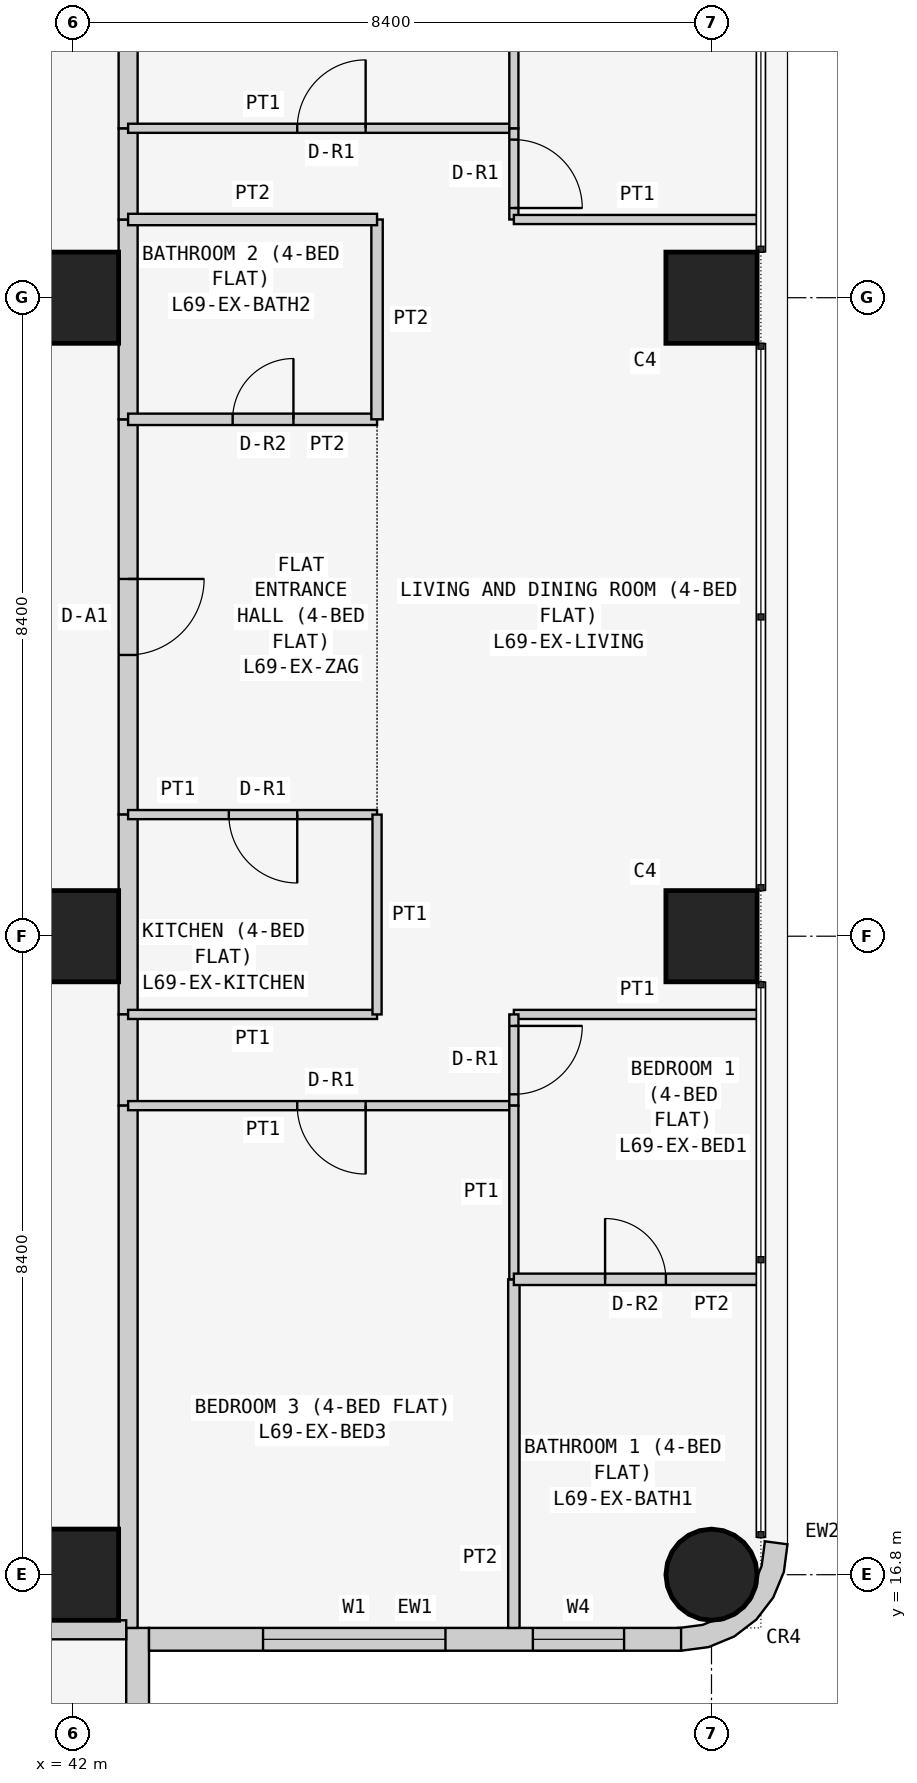
"""IFC4 building model, lengths in metres.
Left out: names, types, materials, properties, quantities, classifications, styles, units other than length and angle.
Written with IfcOpenShell. Run it as: python <this file> out.ifc"""

import sys

from ifc_helpers import new_model, si_unit, direction, frame, frame_2d, origin, origin_2d, place, context, subcontext, project, spatial, polyline, rectangle, circle, outline, extrude, element, fill, save


model = new_model("IFC4")
c1 = context("Model", 3, precision=1e-05, world=origin(), true_north=direction((0.0, 1.0)))
c2 = subcontext(c1, "Body", "Model", "MODEL_VIEW")
j1 = project(units=[si_unit("LENGTHUNIT", "METRE"), si_unit("PLANEANGLEUNIT", "RADIAN")], contexts=[c1])
p1 = place(None, origin())
s1 = spatial("IfcSite", under=j1, at=p1, CompositionType="ELEMENT")
p2 = place(p1, origin())
s2 = spatial("IfcBuilding", under=s1, at=p2, CompositionType="ELEMENT")
p3 = place(p2, frame((0.0, 0.0, 264.9)))
s3 = spatial("IfcBuildingStorey", under=s2, at=p3, CompositionType="ELEMENT", Elevation=264.9)
for number, where, z_axis, x_axis in (
    (1, (42.0, 16.8, 0.0), (0.0, 0.0, 1.0), (1.0, 0.0, 0.0)),
    (2, (42.0, 25.2, 0.0), (0.0, 0.0, 1.0), (1.0, 0.0, 0.0)),
    (3, (42.0, 33.6, 0.0), (0.0, 0.0, 1.0), (1.0, 0.0, 0.0)),
):
    element("IfcColumn", number, at=place(p3, frame(where, z_axis=z_axis, x_axis=x_axis)), inside=s3, PredefinedType="COLUMN", context=c2, shape_type="SweptSolid", body=[
        extrude(rectangle(XDim=1.2, YDim=1.2, at=origin_2d()), origin(), (0.0, 0.0, 1.0), 3.6),
    ])
p4 = place(p3, frame((50.4, 16.8, 0.0), z_axis=(0.0, 0.0, 1.0), x_axis=(1.0, 0.0, 0.0)))
e4 = element("IfcColumn", 4, at=p4, inside=s3, PredefinedType="COLUMN", context=c2, shape_type="SweptSolid", body=[
    extrude(circle(Radius=0.6, at=origin_2d()), origin(), (0.0, 0.0, 1.0), 3.6),
])
for number, where, z_axis, x_axis in (
    (5, (50.4, 25.2, 0.0), (0.0, 0.0, 1.0), (1.0, 0.0, 0.0)),
    (6, (50.4, 33.6, 0.0), (0.0, 0.0, 1.0), (1.0, 0.0, 0.0)),
):
    element("IfcColumn", number, at=place(p3, frame(where, z_axis=z_axis, x_axis=x_axis)), inside=s3, PredefinedType="COLUMN", context=c2, shape_type="SweptSolid", body=[
        extrude(rectangle(XDim=1.2, YDim=1.2, at=origin_2d()), origin(), (0.0, 0.0, 1.0), 3.6),
    ])
p5 = place(p3, frame((42.85, 8.8, 0.0), z_axis=(0.0, 0.0, 1.0), x_axis=(0.0, 1.0, 0.0)))
e7 = element("IfcWall", 7, at=p5, inside=s3, PredefinedType="SOLIDWALL", context=c2, shape_type="SweptSolid", body=[
    extrude(rectangle(XDim=7.3, YDim=0.3, at=frame_2d((3.65, 0.0))), origin(), (0.0, 0.0, 1.0), 3.45),
])
p6 = place(p5, frame((3.1, 0.0, 0.9)))
e8 = element("IfcOpeningElement", 8, at=p6, cuts=e7, PredefinedType="OPENING", context=c2, shape_type="SweptSolid", body=[
    extrude(rectangle(XDim=2.4, YDim=1.5, at=frame_2d((1.2, 0.75))), frame((0.0, 0.16, 0.0), z_axis=(0.0, -1.0, 0.0), x_axis=(1.0, 0.0, 0.0)), (0.0, 0.0, 1.0), 0.32),
])
p7 = place(p5, frame((0.75, 0.0, 0.9)))
e9 = element("IfcOpeningElement", 9, at=p7, cuts=e7, PredefinedType="OPENING", context=c2, shape_type="SweptSolid", body=[
    extrude(rectangle(XDim=1.2, YDim=1.5, at=frame_2d((0.6, 0.75))), frame((0.0, 0.16, 0.0), z_axis=(0.0, -1.0, 0.0), x_axis=(1.0, 0.0, 0.0)), (0.0, 0.0, 1.0), 0.32),
])
p8 = place(p3, frame((43.0, 15.95, 0.0), z_axis=(0.0, 0.0, 1.0), x_axis=(1.0, 0.0, 0.0)))
e10 = element("IfcWall", 10, at=p8, inside=s3, PredefinedType="SOLIDWALL", context=c2, shape_type="SweptSolid", body=[
    extrude(rectangle(XDim=7.0, YDim=0.3, at=frame_2d((3.5, 0.0))), origin(), (0.0, 0.0, 1.0), 3.45),
])
p9 = place(p8, frame((1.5, 0.0, 0.9)))
e11 = element("IfcOpeningElement", 11, at=p9, cuts=e10, PredefinedType="OPENING", context=c2, shape_type="SweptSolid", body=[
    extrude(rectangle(XDim=2.4, YDim=1.5, at=frame_2d((1.2, 0.75))), frame((0.0, 0.16, 0.0), z_axis=(0.0, -1.0, 0.0), x_axis=(1.0, 0.0, 0.0)), (0.0, 0.0, 1.0), 0.32),
])
p10 = place(p8, frame((5.05, 0.0, 0.9)))
e12 = element("IfcOpeningElement", 12, at=p10, cuts=e10, PredefinedType="OPENING", context=c2, shape_type="SweptSolid", body=[
    extrude(rectangle(XDim=1.2, YDim=1.5, at=frame_2d((0.6, 0.75))), frame((0.0, 0.16, 0.0), z_axis=(0.0, -1.0, 0.0), x_axis=(1.0, 0.0, 0.0)), (0.0, 0.0, 1.0), 0.32),
])
p11 = place(p3, frame((50.038, 16.224, 0.0), z_axis=(0.0, 0.0, 1.0), x_axis=(0.707106781187, -0.707106781187, 0.0)))
e13 = element("IfcWall", 13, at=p11, inside=s3, PredefinedType="SOLIDWALL", context=c2, shape_type="SweptSolid", body=[
    extrude(outline(polyline([(0.047, 1.455), (0.233, 1.212), (0.292, 1.069), (0.358, 1.003), (0.449, 0.782), (0.449, 0.543), (0.358, 0.322), (0.292, 0.257), (0.233, 0.114), (0.047, -0.129), (0.033, -0.143), (0.273, -0.327), (0.495, -0.037), (0.635, 0.301), (0.683, 0.663), (0.635, 1.025), (0.495, 1.363), (0.273, 1.653), (0.033, 1.469), (0.047, 1.455)])), origin(), (0.0, 0.0, 1.0), 3.45),
])
p12 = place(p3, frame((42.725, 32.0, 0.0), z_axis=(0.0, 0.0, 1.0), x_axis=(0.0, -1.0, 0.0)))
e14 = element("IfcWall", 14, at=p12, inside=s3, PredefinedType="PARTITIONING", context=c2, shape_type="SweptSolid", body=[
    extrude(rectangle(XDim=5.2, YDim=0.25, at=frame_2d((2.6, 0.0))), origin(), (0.0, 0.0, 1.0), 3.45),
])
p13 = place(p12, frame((2.1, 0.0, 0.0)))
e15 = element("IfcOpeningElement", 15, at=p13, cuts=e14, PredefinedType="OPENING", context=c2, shape_type="SweptSolid", body=[
    extrude(rectangle(XDim=1.0, YDim=2.1, at=frame_2d((0.5, 1.05))), frame((0.0, 0.135, 0.0), z_axis=(0.0, -1.0, 0.0), x_axis=(1.0, 0.0, 0.0)), (0.0, 0.0, 1.0), 0.27),
])
p14 = place(p3, frame((42.725, 34.629, 0.0), z_axis=(0.0, 0.0, 1.0), x_axis=(0.0, -1.0, 0.0)))
e16 = element("IfcWall", 16, at=p14, inside=s3, PredefinedType="PARTITIONING", context=c2, shape_type="SweptSolid", body=[
    extrude(rectangle(XDim=2.629, YDim=0.25, at=frame_2d((1.314, 0.0))), origin(), (0.0, 0.0, 1.0), 3.45),
])
p15 = place(p3, frame((42.725, 26.8, 0.0), z_axis=(0.0, 0.0, 1.0), x_axis=(0.0, -1.0, 0.0)))
e17 = element("IfcWall", 17, at=p15, inside=s3, PredefinedType="PARTITIONING", context=c2, shape_type="SweptSolid", body=[
    extrude(rectangle(XDim=2.629, YDim=0.25, at=frame_2d((1.314, 0.0))), origin(), (0.0, 0.0, 1.0), 3.45),
])
p16 = place(p3, frame((42.725, 24.171, 0.0), z_axis=(0.0, 0.0, 1.0), x_axis=(0.0, -1.0, 0.0)))
e18 = element("IfcWall", 18, at=p16, inside=s3, PredefinedType="PARTITIONING", context=c2, shape_type="SweptSolid", body=[
    extrude(rectangle(XDim=1.2, YDim=0.25, at=frame_2d((0.6, 0.0))), origin(), (0.0, 0.0, 1.0), 3.45),
])
p17 = place(p3, frame((42.725, 35.829, 0.0), z_axis=(0.0, 0.0, 1.0), x_axis=(0.0, -1.0, 0.0)))
e19 = element("IfcWall", 19, at=p17, inside=s3, PredefinedType="PARTITIONING", context=c2, shape_type="SweptSolid", body=[
    extrude(rectangle(XDim=1.2, YDim=0.25, at=frame_2d((0.6, 0.0))), origin(), (0.0, 0.0, 1.0), 3.45),
])
for number, where, z_axis, x_axis in (
    (20, (42.725, 42.7, 0.0), (0.0, 0.0, 1.0), (0.0, -1.0, 0.0)),
    (21, (42.725, 22.971, 0.0), (0.0, 0.0, 1.0), (0.0, -1.0, 0.0)),
    (22, (42.7, 16.075, 0.0), (0.0, 0.0, 1.0), (-1.0, 0.0, 0.0)),
):
    element("IfcWall", number, at=place(p3, frame(where, z_axis=z_axis, x_axis=x_axis)), inside=s3, PredefinedType="PARTITIONING", context=c2, shape_type="SweptSolid", body=[
        extrude(rectangle(XDim=6.871, YDim=0.25, at=frame_2d((3.436, 0.0))), origin(), (0.0, 0.0, 1.0), 3.45),
    ])
p18 = place(p3, frame((46.0, 32.0, 0.0), z_axis=(0.0, 0.0, 1.0), x_axis=(-1.0, 0.0, 0.0)))
e23 = element("IfcWall", 23, at=p18, inside=s3, PredefinedType="PARTITIONING", context=c2, shape_type="SweptSolid", body=[
    extrude(rectangle(XDim=3.275, YDim=0.15, at=frame_2d((1.637, 0.0))), origin(), (0.0, 0.0, 1.0), 3.45),
])
p19 = place(p18, frame((1.1, 0.0, 0.0)))
e24 = element("IfcOpeningElement", 24, at=p19, cuts=e23, PredefinedType="OPENING", context=c2, shape_type="SweptSolid", body=[
    extrude(rectangle(XDim=0.8, YDim=2.1, at=frame_2d((0.4, 1.05))), frame((0.0, 0.085, 0.0), z_axis=(0.0, -1.0, 0.0), x_axis=(1.0, 0.0, 0.0)), (0.0, 0.0, 1.0), 0.17),
])
p20 = place(p3, frame((42.725, 26.8, 0.0), z_axis=(0.0, 0.0, 1.0), x_axis=(1.0, 0.0, 0.0)))
e25 = element("IfcWall", 25, at=p20, inside=s3, PredefinedType="PARTITIONING", context=c2, shape_type="SweptSolid", body=[
    extrude(rectangle(XDim=3.275, YDim=0.12, at=frame_2d((1.637, 0.0))), origin(), (0.0, 0.0, 1.0), 3.45),
])
p21 = place(p20, frame((1.325, 0.0, 0.0)))
e26 = element("IfcOpeningElement", 26, at=p21, cuts=e25, PredefinedType="OPENING", context=c2, shape_type="SweptSolid", body=[
    extrude(rectangle(XDim=0.9, YDim=2.1, at=frame_2d((0.45, 1.05))), frame((0.0, 0.07, 0.0), z_axis=(0.0, -1.0, 0.0), x_axis=(1.0, 0.0, 0.0)), (0.0, 0.0, 1.0), 0.14),
])
p22 = place(p3, frame((46.0, 32.0, 0.0), z_axis=(0.0, 0.0, 1.0), x_axis=(0.0, 1.0, 0.0)))
e27 = element("IfcWall", 27, at=p22, inside=s3, PredefinedType="PARTITIONING", context=c2, shape_type="SweptSolid", body=[
    extrude(rectangle(XDim=2.629, YDim=0.15, at=frame_2d((1.314, 0.0))), origin(), (0.0, 0.0, 1.0), 3.45),
])
p23 = place(p3, frame((46.0, 34.629, 0.0), z_axis=(0.0, 0.0, 1.0), x_axis=(-1.0, 0.0, 0.0)))
e28 = element("IfcWall", 28, at=p23, inside=s3, PredefinedType="PARTITIONING", context=c2, shape_type="SweptSolid", body=[
    extrude(rectangle(XDim=3.275, YDim=0.15, at=frame_2d((1.637, 0.0))), origin(), (0.0, 0.0, 1.0), 3.45),
])
p24 = place(p3, frame((42.725, 24.171, 0.0), z_axis=(0.0, 0.0, 1.0), x_axis=(1.0, 0.0, 0.0)))
e29 = element("IfcWall", 29, at=p24, inside=s3, PredefinedType="PARTITIONING", context=c2, shape_type="SweptSolid", body=[
    extrude(rectangle(XDim=3.275, YDim=0.12, at=frame_2d((1.637, 0.0))), origin(), (0.0, 0.0, 1.0), 3.45),
])
p25 = place(p3, frame((46.0, 24.171, 0.0), z_axis=(0.0, 0.0, 1.0), x_axis=(0.0, 1.0, 0.0)))
e30 = element("IfcWall", 30, at=p25, inside=s3, PredefinedType="PARTITIONING", context=c2, shape_type="SweptSolid", body=[
    extrude(rectangle(XDim=2.629, YDim=0.12, at=frame_2d((1.314, 0.0))), origin(), (0.0, 0.0, 1.0), 3.45),
])
p26 = place(p3, frame((42.725, 35.829, 0.0), z_axis=(0.0, 0.0, 1.0), x_axis=(1.0, 0.0, 0.0)))
e31 = element("IfcWall", 31, at=p26, inside=s3, PredefinedType="PARTITIONING", context=c2, shape_type="SweptSolid", body=[
    extrude(rectangle(XDim=5.075, YDim=0.12, at=frame_2d((2.538, 0.0))), origin(), (0.0, 0.0, 1.0), 3.45),
])
p27 = place(p26, frame((2.225, 0.0, 0.0)))
e32 = element("IfcOpeningElement", 32, at=p27, cuts=e31, PredefinedType="OPENING", context=c2, shape_type="SweptSolid", body=[
    extrude(rectangle(XDim=0.9, YDim=2.1, at=frame_2d((0.45, 1.05))), frame((0.0, 0.07, 0.0), z_axis=(0.0, -1.0, 0.0), x_axis=(1.0, 0.0, 0.0)), (0.0, 0.0, 1.0), 0.14),
])
p28 = place(p3, frame((47.8, 35.829, 0.0), z_axis=(0.0, 0.0, 1.0), x_axis=(0.0, -1.0, 0.0)))
e33 = element("IfcWall", 33, at=p28, inside=s3, PredefinedType="PARTITIONING", context=c2, shape_type="SweptSolid", body=[
    extrude(rectangle(XDim=1.2, YDim=0.12, at=frame_2d((0.6, 0.0))), origin(), (0.0, 0.0, 1.0), 3.45),
])
p29 = place(p28, frame((0.149, 0.0, 0.0)))
e34 = element("IfcOpeningElement", 34, at=p29, cuts=e33, PredefinedType="OPENING", context=c2, shape_type="SweptSolid", body=[
    extrude(rectangle(XDim=0.9, YDim=2.1, at=frame_2d((0.45, 1.05))), frame((0.0, 0.07, 0.0), z_axis=(0.0, -1.0, 0.0), x_axis=(1.0, 0.0, 0.0)), (0.0, 0.0, 1.0), 0.14),
])
p30 = place(p3, frame((47.8, 34.629, 0.0), z_axis=(0.0, 0.0, 1.0), x_axis=(1.0, 0.0, 0.0)))
e35 = element("IfcWall", 35, at=p30, inside=s3, PredefinedType="PARTITIONING", context=c2, shape_type="SweptSolid", body=[
    extrude(rectangle(XDim=3.25, YDim=0.12, at=frame_2d((1.625, 0.0))), origin(), (0.0, 0.0, 1.0), 3.45),
])
p31 = place(p3, frame((47.8, 22.971, 0.0), z_axis=(0.0, 0.0, 1.0), x_axis=(-1.0, 0.0, 0.0)))
e36 = element("IfcWall", 36, at=p31, inside=s3, PredefinedType="PARTITIONING", context=c2, shape_type="SweptSolid", body=[
    extrude(rectangle(XDim=5.075, YDim=0.12, at=frame_2d((2.538, 0.0))), origin(), (0.0, 0.0, 1.0), 3.45),
])
p32 = place(p31, frame((1.95, 0.0, 0.0)))
e37 = element("IfcOpeningElement", 37, at=p32, cuts=e36, PredefinedType="OPENING", context=c2, shape_type="SweptSolid", body=[
    extrude(rectangle(XDim=0.9, YDim=2.1, at=frame_2d((0.45, 1.05))), frame((0.0, 0.07, 0.0), z_axis=(0.0, -1.0, 0.0), x_axis=(1.0, 0.0, 0.0)), (0.0, 0.0, 1.0), 0.14),
])
p33 = place(p3, frame((51.05, 24.171, 0.0), z_axis=(0.0, 0.0, 1.0), x_axis=(-1.0, 0.0, 0.0)))
e38 = element("IfcWall", 38, at=p33, inside=s3, PredefinedType="PARTITIONING", context=c2, shape_type="SweptSolid", body=[
    extrude(rectangle(XDim=3.25, YDim=0.12, at=frame_2d((1.625, 0.0))), origin(), (0.0, 0.0, 1.0), 3.45),
])
p34 = place(p3, frame((47.8, 24.171, 0.0), z_axis=(0.0, 0.0, 1.0), x_axis=(0.0, -1.0, 0.0)))
e39 = element("IfcWall", 39, at=p34, inside=s3, PredefinedType="PARTITIONING", context=c2, shape_type="SweptSolid", body=[
    extrude(rectangle(XDim=1.2, YDim=0.12, at=frame_2d((0.6, 0.0))), origin(), (0.0, 0.0, 1.0), 3.45),
])
p35 = place(p34, frame((0.151, 0.0, 0.0)))
e40 = element("IfcOpeningElement", 40, at=p35, cuts=e39, PredefinedType="OPENING", context=c2, shape_type="SweptSolid", body=[
    extrude(rectangle(XDim=0.9, YDim=2.1, at=frame_2d((0.45, 1.05))), frame((0.0, 0.07, 0.0), z_axis=(0.0, -1.0, 0.0), x_axis=(1.0, 0.0, 0.0)), (0.0, 0.0, 1.0), 0.14),
])
p36 = place(p3, frame((47.8, 35.829, 0.0), z_axis=(0.0, 0.0, 1.0), x_axis=(0.0, 1.0, 0.0)))
e41 = element("IfcWall", 41, at=p36, inside=s3, PredefinedType="PARTITIONING", context=c2, shape_type="SweptSolid", body=[
    extrude(rectangle(XDim=6.871, YDim=0.12, at=frame_2d((3.436, 0.0))), origin(), (0.0, 0.0, 1.0), 3.45),
])
p37 = place(p3, frame((47.8, 16.1, 0.0), z_axis=(0.0, 0.0, 1.0), x_axis=(0.0, 1.0, 0.0)))
e42 = element("IfcWall", 42, at=p37, inside=s3, PredefinedType="PARTITIONING", context=c2, shape_type="SweptSolid", body=[
    extrude(rectangle(XDim=4.586, YDim=0.15, at=frame_2d((2.293, 0.0))), origin(), (0.0, 0.0, 1.0), 3.45),
])
p38 = place(p3, frame((47.8, 20.686, 0.0), z_axis=(0.0, 0.0, 1.0), x_axis=(0.0, 1.0, 0.0)))
e43 = element("IfcWall", 43, at=p38, inside=s3, PredefinedType="PARTITIONING", context=c2, shape_type="SweptSolid", body=[
    extrude(rectangle(XDim=2.285, YDim=0.12, at=frame_2d((1.143, 0.0))), origin(), (0.0, 0.0, 1.0), 3.45),
])
p39 = place(p3, frame((51.05, 20.686, 0.0), z_axis=(0.0, 0.0, 1.0), x_axis=(-1.0, 0.0, 0.0)))
e44 = element("IfcWall", 44, at=p39, inside=s3, PredefinedType="PARTITIONING", context=c2, shape_type="SweptSolid", body=[
    extrude(rectangle(XDim=3.25, YDim=0.15, at=frame_2d((1.625, 0.0))), origin(), (0.0, 0.0, 1.0), 3.45),
])
p40 = place(p39, frame((1.25, 0.0, 0.0)))
e45 = element("IfcOpeningElement", 45, at=p40, cuts=e44, PredefinedType="OPENING", context=c2, shape_type="SweptSolid", body=[
    extrude(rectangle(XDim=0.8, YDim=2.1, at=frame_2d((0.4, 1.05))), frame((0.0, 0.085, 0.0), z_axis=(0.0, -1.0, 0.0), x_axis=(1.0, 0.0, 0.0)), (0.0, 0.0, 1.0), 0.17),
])
p41 = place(p9, origin())
e46 = element("IfcWindow", 46, at=p41, inside=s3, PartitioningType="SINGLE_PANEL", PredefinedType="WINDOW", context=c2, shape_type="SweptSolid", body=[
    extrude(rectangle(XDim=2.4, YDim=1.5, at=frame_2d((1.2, 0.75))), frame((0.0, 0.03, 0.0), z_axis=(0.0, -1.0, 0.0), x_axis=(1.0, 0.0, 0.0)), (0.0, 0.0, 1.0), 0.06),
])
fill(e11, e46)
p42 = place(p10, origin())
e47 = element("IfcWindow", 47, at=p42, inside=s3, PartitioningType="SINGLE_PANEL", PredefinedType="WINDOW", context=c2, shape_type="SweptSolid", body=[
    extrude(rectangle(XDim=1.2, YDim=1.5, at=frame_2d((0.6, 0.75))), frame((0.0, 0.03, 0.0), z_axis=(0.0, -1.0, 0.0), x_axis=(1.0, 0.0, 0.0)), (0.0, 0.0, 1.0), 0.06),
])
fill(e12, e47)
p43 = place(p13, origin())
e48 = element("IfcDoor", 48, at=p43, inside=s3, OperationType="SINGLE_SWING_LEFT", PredefinedType="DOOR", context=c2, shape_type="SweptSolid", body=[
    extrude(rectangle(XDim=1.0, YDim=2.1, at=frame_2d((0.5, 1.05))), frame((0.0, 0.025, 0.0), z_axis=(0.0, -1.0, 0.0), x_axis=(1.0, 0.0, 0.0)), (0.0, 0.0, 1.0), 0.05),
])
fill(e15, e48)
p44 = place(p19, frame((0.8, 0.0, 0.0), z_axis=(0.0, 0.0, 1.0), x_axis=(-1.0, 0.0, 0.0)))
e49 = element("IfcDoor", 49, at=p44, inside=s3, OperationType="SINGLE_SWING_RIGHT", PredefinedType="DOOR", context=c2, shape_type="SweptSolid", body=[
    extrude(rectangle(XDim=0.8, YDim=2.1, at=frame_2d((0.4, 1.05))), frame((0.0, 0.025, 0.0), z_axis=(0.0, -1.0, 0.0), x_axis=(1.0, 0.0, 0.0)), (0.0, 0.0, 1.0), 0.05),
])
fill(e24, e49)
p45 = place(p21, frame((0.9, 0.0, 0.0), z_axis=(0.0, 0.0, 1.0), x_axis=(-1.0, 0.0, 0.0)))
e50 = element("IfcDoor", 50, at=p45, inside=s3, OperationType="SINGLE_SWING_LEFT", PredefinedType="DOOR", context=c2, shape_type="SweptSolid", body=[
    extrude(rectangle(XDim=0.9, YDim=2.1, at=frame_2d((0.45, 1.05))), frame((0.0, 0.025, 0.0), z_axis=(0.0, -1.0, 0.0), x_axis=(1.0, 0.0, 0.0)), (0.0, 0.0, 1.0), 0.05),
])
fill(e26, e50)
p46 = place(p27, origin())
e51 = element("IfcDoor", 51, at=p46, inside=s3, OperationType="SINGLE_SWING_RIGHT", PredefinedType="DOOR", context=c2, shape_type="SweptSolid", body=[
    extrude(rectangle(XDim=0.9, YDim=2.1, at=frame_2d((0.45, 1.05))), frame((0.0, 0.025, 0.0), z_axis=(0.0, -1.0, 0.0), x_axis=(1.0, 0.0, 0.0)), (0.0, 0.0, 1.0), 0.05),
])
fill(e32, e51)
p47 = place(p29, origin())
e52 = element("IfcDoor", 52, at=p47, inside=s3, OperationType="SINGLE_SWING_RIGHT", PredefinedType="DOOR", context=c2, shape_type="SweptSolid", body=[
    extrude(rectangle(XDim=0.9, YDim=2.1, at=frame_2d((0.45, 1.05))), frame((0.0, 0.025, 0.0), z_axis=(0.0, -1.0, 0.0), x_axis=(1.0, 0.0, 0.0)), (0.0, 0.0, 1.0), 0.05),
])
fill(e34, e52)
p48 = place(p32, origin())
e53 = element("IfcDoor", 53, at=p48, inside=s3, OperationType="SINGLE_SWING_LEFT", PredefinedType="DOOR", context=c2, shape_type="SweptSolid", body=[
    extrude(rectangle(XDim=0.9, YDim=2.1, at=frame_2d((0.45, 1.05))), frame((0.0, 0.025, 0.0), z_axis=(0.0, -1.0, 0.0), x_axis=(1.0, 0.0, 0.0)), (0.0, 0.0, 1.0), 0.05),
])
fill(e37, e53)
p49 = place(p35, origin())
e54 = element("IfcDoor", 54, at=p49, inside=s3, OperationType="SINGLE_SWING_LEFT", PredefinedType="DOOR", context=c2, shape_type="SweptSolid", body=[
    extrude(rectangle(XDim=0.9, YDim=2.1, at=frame_2d((0.45, 1.05))), frame((0.0, 0.025, 0.0), z_axis=(0.0, -1.0, 0.0), x_axis=(1.0, 0.0, 0.0)), (0.0, 0.0, 1.0), 0.05),
])
fill(e40, e54)
p50 = place(p40, frame((0.8, 0.0, 0.0), z_axis=(0.0, 0.0, 1.0), x_axis=(-1.0, 0.0, 0.0)))
e55 = element("IfcDoor", 55, at=p50, inside=s3, OperationType="SINGLE_SWING_LEFT", PredefinedType="DOOR", context=c2, shape_type="SweptSolid", body=[
    extrude(rectangle(XDim=0.8, YDim=2.1, at=frame_2d((0.4, 1.05))), frame((0.0, 0.025, 0.0), z_axis=(0.0, -1.0, 0.0), x_axis=(1.0, 0.0, 0.0)), (0.0, 0.0, 1.0), 0.05),
])
fill(e45, e55)
save(model, sys.argv[1])
